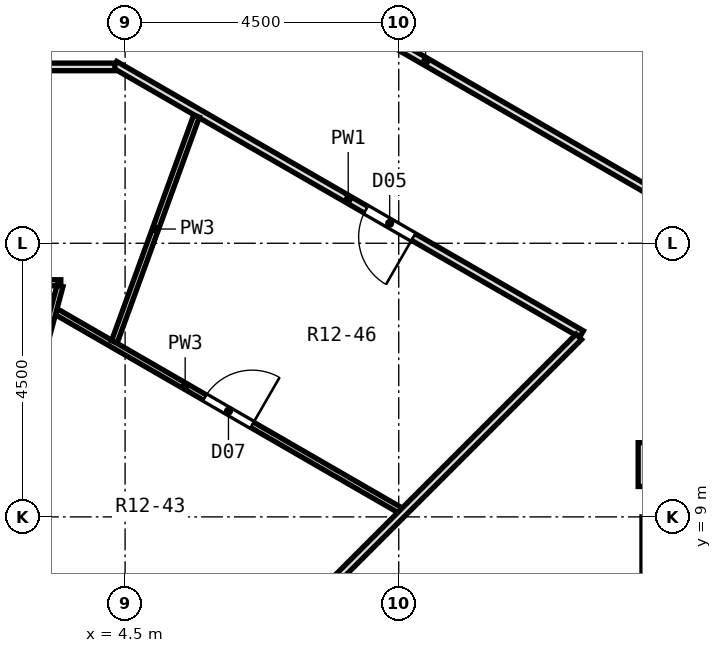
"""IFC4 building model, lengths in metres.
Left out: names, types, materials, properties, quantities, classifications, styles, units other than length and angle.
Written with IfcOpenShell. Run it as: python <this file> out.ifc"""

import sys

from ifc_helpers import new_model, si_unit, direction, frame, frame_2d, origin, place, context, subcontext, project, spatial, rectangle, extrude, element, fill, save


model = new_model("IFC4")
c1 = context("Model", 3, precision=1e-05, world=origin(), true_north=direction((0.0, 1.0)))
c2 = subcontext(c1, "Body", "Model", "MODEL_VIEW")
j1 = project(units=[si_unit("LENGTHUNIT", "METRE"), si_unit("PLANEANGLEUNIT", "RADIAN")], contexts=[c1])
p1 = place(None, origin())
s1 = spatial("IfcSite", under=j1, at=p1, CompositionType="ELEMENT")
p2 = place(p1, origin())
s2 = spatial("IfcBuilding", under=s1, at=p2, CompositionType="ELEMENT")
p3 = place(p2, frame((0.0, 0.0, 56.0)))
s3 = spatial("IfcBuildingStorey", under=s2, at=p3, CompositionType="ELEMENT", Elevation=56.0)
p4 = place(p3, frame((13.5, -9.0, 0.0), z_axis=(0.0, 0.0, 1.0), x_axis=(0.0, 1.0, 0.0)))
e1 = element("IfcWall", 1, at=p4, inside=s3, PredefinedType="SHEAR", context=c2, shape_type="SweptSolid", body=[
    extrude(rectangle(XDim=18.0, YDim=1.0, at=frame_2d((9.0, 0.0))), origin(), (0.0, 0.0, 1.0), 3.3),
])
p5 = place(p4, frame((15.4, 0.0, 0.0)))
e2 = element("IfcOpeningElement", 2, at=p5, cuts=e1, PredefinedType="OPENING", context=c2, shape_type="SweptSolid", body=[
    extrude(rectangle(XDim=1.2, YDim=2.1, at=frame_2d((0.6, 1.05))), frame((0.0, 0.512, 0.0), z_axis=(0.0, -1.0, 0.0), x_axis=(1.0, 0.0, 0.0)), (0.0, 0.0, 1.0), 1.024),
])
p6 = place(p4, frame((1.4, 0.0, 0.0)))
e3 = element("IfcOpeningElement", 3, at=p6, cuts=e1, PredefinedType="OPENING", context=c2, shape_type="SweptSolid", body=[
    extrude(rectangle(XDim=1.2, YDim=2.1, at=frame_2d((0.6, 1.05))), frame((0.0, 0.512, 0.0), z_axis=(0.0, -1.0, 0.0), x_axis=(1.0, 0.0, 0.0)), (0.0, 0.0, 1.0), 1.024),
])
p7 = place(p4, frame((7.5, 0.0, 0.0)))
e4 = element("IfcOpeningElement", 4, at=p7, cuts=e1, PredefinedType="OPENING", context=c2, shape_type="SweptSolid", body=[
    extrude(rectangle(XDim=3.0, YDim=2.4, at=frame_2d((1.5, 1.2))), frame((0.0, 0.512, 0.0), z_axis=(0.0, -1.0, 0.0), x_axis=(1.0, 0.0, 0.0)), (0.0, 0.0, 1.0), 1.024),
])
p8 = place(p3, frame((5.72, 6.282, 0.0), z_axis=(0.0, 0.0, 1.0), x_axis=(-0.866029693906, 0.499992569217, 0.0)))
e5 = element("IfcWall", 5, at=p8, inside=s3, PredefinedType="SOLIDWALL", context=c2, shape_type="SweptSolid", body=[
    extrude(rectangle(XDim=3.625, YDim=0.6, at=frame_2d((1.812, 0.0))), origin(), (0.0, 0.0, 1.0), 2.75),
])
p9 = place(p8, frame((0.613, 0.0, 0.9)))
e6 = element("IfcOpeningElement", 6, at=p9, cuts=e5, PredefinedType="OPENING", context=c2, shape_type="SweptSolid", body=[
    extrude(rectangle(XDim=2.4, YDim=1.8, at=frame_2d((1.2, 0.9))), frame((0.0, 0.312, 0.0), z_axis=(0.0, -1.0, 0.0), x_axis=(1.0, 0.0, 0.0)), (0.0, 0.0, 1.0), 0.624),
])
p10 = place(p3, frame((13.035, 10.222, 0.0), z_axis=(0.0, 0.0, 1.0), x_axis=(0.49991670217, -0.866073490468, 0.0)))
e7 = element("IfcWall", 7, at=p10, inside=s3, PredefinedType="PARTITIONING", context=c2, shape_type="SweptSolid", body=[
    extrude(rectangle(XDim=0.834, YDim=0.125, at=frame_2d((0.417, 0.0))), origin(), (0.0, 0.0, 1.0), 2.75),
])
p11 = place(p3, frame((3.366, 12.375, 0.0), z_axis=(0.0, 0.0, 1.0), x_axis=(0.86596399252, -0.500106352348, 0.0)))
e8 = element("IfcWall", 8, at=p11, inside=s3, PredefinedType="PARTITIONING", context=c2, shape_type="SweptSolid", body=[
    extrude(rectangle(XDim=6.532, YDim=0.1, at=frame_2d((3.266, 0.0))), origin(), (0.0, 0.0, 1.0), 2.75),
])
p12 = place(p11, frame((2.822, 0.0, 0.0)))
e9 = element("IfcOpeningElement", 9, at=p12, cuts=e8, PredefinedType="OPENING", context=c2, shape_type="SweptSolid", body=[
    extrude(rectangle(XDim=0.9, YDim=2.1, at=frame_2d((0.45, 1.05))), frame((0.0, 0.062, 0.0), z_axis=(0.0, -1.0, 0.0), x_axis=(1.0, 0.0, 0.0)), (0.0, 0.0, 1.0), 0.124),
])
p13 = place(p3, frame((4.332, 16.436, 0.0), z_axis=(0.0, 0.0, 1.0), x_axis=(0.866073188118, -0.499917225971, 0.0)))
e10 = element("IfcWall", 10, at=p13, inside=s3, PredefinedType="PARTITIONING", context=c2, shape_type="SweptSolid", body=[
    extrude(rectangle(XDim=8.861, YDim=0.125, at=frame_2d((4.431, 0.0))), origin(), (0.0, 0.0, 1.0), 2.75),
])
p14 = place(p13, frame((4.768, 0.0, 0.0)))
e11 = element("IfcOpeningElement", 11, at=p14, cuts=e10, PredefinedType="OPENING", context=c2, shape_type="SweptSolid", body=[
    extrude(rectangle(XDim=0.9, YDim=2.1, at=frame_2d((0.45, 1.05))), frame((0.0, 0.074, 0.0), z_axis=(0.0, -1.0, 0.0), x_axis=(1.0, 0.0, 0.0)), (0.0, 0.0, 1.0), 0.149),
])
p15 = place(p3, frame((5.029, 19.036, 0.0), z_axis=(0.0, 0.0, 1.0), x_axis=(0.866024825845, -0.50000100102, 0.0)))
e12 = element("IfcWall", 12, at=p15, inside=s3, PredefinedType="PARTITIONING", context=c2, shape_type="SweptSolid", body=[
    extrude(rectangle(XDim=10.192, YDim=0.125, at=frame_2d((5.096, 0.0))), origin(), (0.0, 0.0, 1.0), 2.75),
])
p16 = place(p3, frame((-3.393, 12.85, 0.0), z_axis=(0.0, 0.0, 1.0), x_axis=(1.0, 0.0, 0.0)))
e13 = element("IfcWall", 13, at=p16, inside=s3, PredefinedType="PARTITIONING", context=c2, shape_type="SweptSolid", body=[
    extrude(rectangle(XDim=6.836, YDim=0.1, at=frame_2d((3.418, 0.0))), origin(), (0.0, 0.0, 1.0), 2.75),
])
p17 = place(p16, frame((2.943, 0.0, 0.0)))
e14 = element("IfcOpeningElement", 14, at=p17, cuts=e13, PredefinedType="OPENING", context=c2, shape_type="SweptSolid", body=[
    extrude(rectangle(XDim=0.9, YDim=2.1, at=frame_2d((0.45, 1.05))), frame((0.0, 0.062, 0.0), z_axis=(0.0, -1.0, 0.0), x_axis=(1.0, 0.0, 0.0)), (0.0, 0.0, 1.0), 0.124),
])
p18 = place(p3, frame((-4.466, 16.4, 0.0), z_axis=(0.0, 0.0, 1.0), x_axis=(1.0, 0.0, 0.0)))
e15 = element("IfcWall", 15, at=p18, inside=s3, PredefinedType="PARTITIONING", context=c2, shape_type="SweptSolid", body=[
    extrude(rectangle(XDim=8.798, YDim=0.125, at=frame_2d((4.399, 0.0))), origin(), (0.0, 0.0, 1.0), 2.75),
])
p19 = place(p18, frame((5.496, 0.0, 0.0)))
e16 = element("IfcOpeningElement", 16, at=p19, cuts=e15, PredefinedType="OPENING", context=c2, shape_type="SweptSolid", body=[
    extrude(rectangle(XDim=0.9, YDim=2.1, at=frame_2d((0.45, 1.05))), frame((0.0, 0.074, 0.0), z_axis=(0.0, -1.0, 0.0), x_axis=(1.0, 0.0, 0.0)), (0.0, 0.0, 1.0), 0.149),
])
p20 = place(p3, frame((6.783, 6.783, 0.0), z_axis=(0.0, 0.0, 1.0), x_axis=(0.707106781187, 0.707106781187, 0.0)))
e17 = element("IfcWall", 17, at=p20, inside=s3, PredefinedType="PARTITIONING", context=c2, shape_type="SweptSolid", body=[
    extrude(rectangle(XDim=7.324, YDim=0.125, at=frame_2d((3.662, 0.0))), origin(), (0.0, 0.0, 1.0), 2.75),
])
p21 = place(p3, frame((4.324, 11.879, 0.0), z_axis=(0.0, 0.0, 1.0), x_axis=(0.341946576705, 0.939719393585, 0.0)))
e18 = element("IfcWall", 18, at=p21, inside=s3, PredefinedType="PARTITIONING", context=c2, shape_type="SweptSolid", body=[
    extrude(rectangle(XDim=3.949, YDim=0.1, at=frame_2d((1.975, 0.0))), origin(), (0.0, 0.0, 1.0), 2.75),
])
p22 = place(p3, frame((2.483, 9.265, 0.0), z_axis=(0.0, 0.0, 1.0), x_axis=(0.258882752153, 0.965908753784, 0.0)))
e19 = element("IfcWall", 19, at=p22, inside=s3, PredefinedType="PARTITIONING", context=c2, shape_type="SweptSolid", body=[
    extrude(rectangle(XDim=3.661, YDim=0.1, at=frame_2d((1.831, 0.0))), origin(), (0.0, 0.0, 1.0), 2.75),
])
p23 = place(p3, frame((13.0, 9.5, 0.0), z_axis=(0.0, 0.0, 1.0), x_axis=(0.0, 1.0, 0.0)))
e20 = element("IfcWall", 20, at=p23, inside=s3, PredefinedType="PARTITIONING", context=c2, shape_type="SweptSolid", body=[
    extrude(rectangle(XDim=0.72, YDim=0.125, at=frame_2d((0.36, 0.0))), origin(), (0.0, 0.0, 1.0), 2.75),
])
p24 = place(p14, frame((0.9, 0.0, 0.0), z_axis=(0.0, 0.0, 1.0), x_axis=(-1.0, 0.0, 0.0)))
e21 = element("IfcDoor", 21, at=p24, inside=s3, OperationType="SINGLE_SWING_LEFT", PredefinedType="DOOR", context=c2, shape_type="SweptSolid", body=[
    extrude(rectangle(XDim=0.9, YDim=2.1, at=frame_2d((0.45, 1.05))), frame((0.0, 0.025, 0.0), z_axis=(0.0, -1.0, 0.0), x_axis=(1.0, 0.0, 0.0)), (0.0, 0.0, 1.0), 0.05),
])
fill(e11, e21)
p25 = place(p12, origin())
e22 = element("IfcDoor", 22, at=p25, inside=s3, OperationType="SINGLE_SWING_RIGHT", PredefinedType="DOOR", context=c2, shape_type="SweptSolid", body=[
    extrude(rectangle(XDim=0.9, YDim=2.1, at=frame_2d((0.45, 1.05))), frame((0.0, 0.025, 0.0), z_axis=(0.0, -1.0, 0.0), x_axis=(1.0, 0.0, 0.0)), (0.0, 0.0, 1.0), 0.05),
])
fill(e9, e22)
save(model, sys.argv[1])
